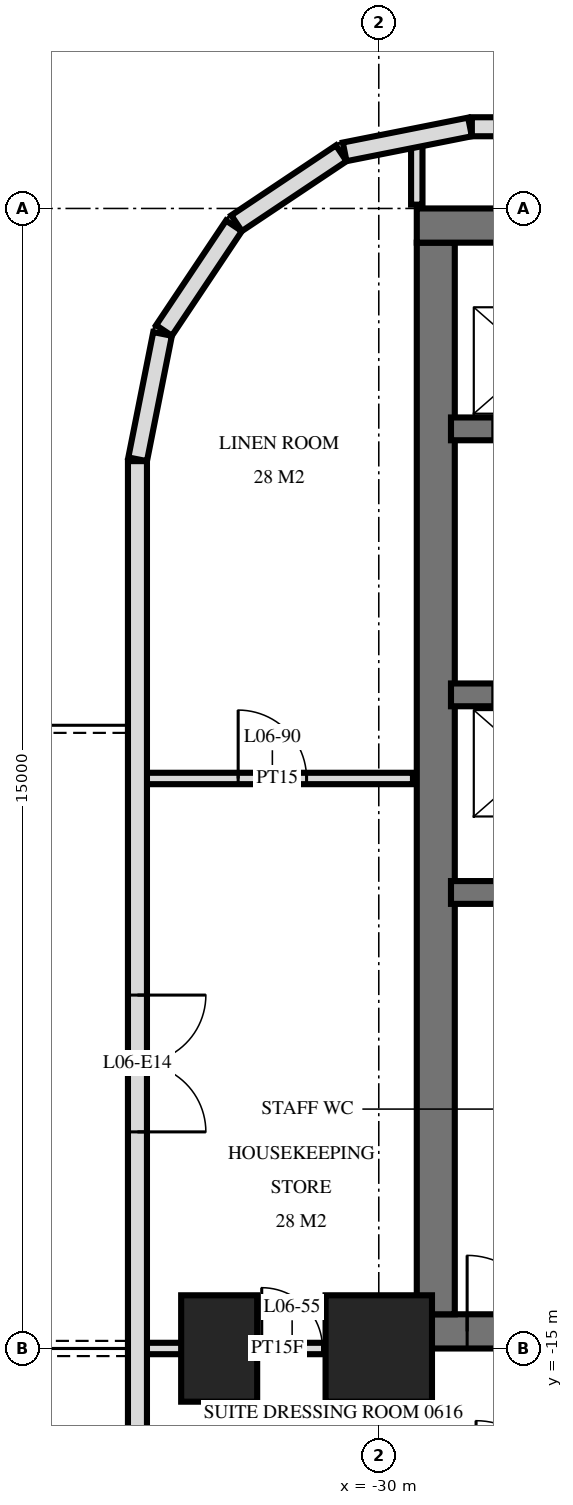
"""IFC4 building model, lengths in metres.
Left out: names, types, materials, properties, quantities, classifications, styles, units other than length and angle.
Written with IfcOpenShell. Run it as: python <this file> out.ifc"""

import sys

from ifc_helpers import new_model, si_unit, direction, frame, frame_2d, origin, origin_2d, place, context, subcontext, project, spatial, rectangle, extrude, element, fill, save


model = new_model("IFC4")
c1 = context("Model", 3, precision=1e-05, world=origin(), true_north=direction((0.0, 1.0)))
c2 = subcontext(c1, "Body", "Model", "MODEL_VIEW")
j1 = project(units=[si_unit("LENGTHUNIT", "METRE"), si_unit("PLANEANGLEUNIT", "RADIAN")], contexts=[c1])
p1 = place(None, origin())
s1 = spatial("IfcSite", under=j1, at=p1, CompositionType="ELEMENT")
p2 = place(p1, origin())
s2 = spatial("IfcBuilding", under=s1, at=p2, CompositionType="ELEMENT")
p3 = place(p2, frame((0.0, 0.0, 31.2)))
s3 = spatial("IfcBuildingStorey", under=s2, at=p3, CompositionType="ELEMENT", Elevation=31.2)
p4 = place(p3, frame((-32.1, -15.0, 0.0), z_axis=(0.0, 0.0, 1.0), x_axis=(0.0, 1.0, 0.0)))
e1 = element("IfcColumn", 1, at=p4, inside=s3, PredefinedType="COLUMN", context=c2, shape_type="SweptSolid", body=[
    extrude(rectangle(XDim=1.4, YDim=1.0, at=origin_2d()), origin(), (0.0, 0.0, 1.0), 3.6),
])
p5 = place(p3, frame((-30.0, -15.0, 0.0), z_axis=(0.0, 0.0, 1.0), x_axis=(1.0, 0.0, 0.0)))
e2 = element("IfcColumn", 2, at=p5, inside=s3, PredefinedType="COLUMN", context=c2, shape_type="SweptSolid", body=[
    extrude(rectangle(XDim=1.4, YDim=1.4, at=origin_2d()), origin(), (0.0, 0.0, 1.0), 3.6),
])
p6 = place(p3, frame((-29.5, -0.225, 0.0), z_axis=(0.0, 0.0, 1.0), x_axis=(1.0, 0.0, 0.0)))
e3 = element("IfcWall", 3, at=p6, inside=s3, PredefinedType="SHEAR", context=c2, shape_type="SweptSolid", body=[
    extrude(rectangle(XDim=19.5, YDim=0.45, at=frame_2d((9.75, 0.0))), origin(), (0.0, 0.0, 1.0), 3.6),
])
p7 = place(p3, frame((-29.5, -14.775, 0.0), z_axis=(0.0, 0.0, 1.0), x_axis=(1.0, 0.0, 0.0)))
e4 = element("IfcWall", 4, at=p7, inside=s3, PredefinedType="SHEAR", context=c2, shape_type="SweptSolid", body=[
    extrude(rectangle(XDim=19.5, YDim=0.45, at=frame_2d((9.75, 0.0))), origin(), (0.0, 0.0, 1.0), 3.6),
])
p8 = place(p7, frame((11.2, 0.0, 0.0)))
e5 = element("IfcOpeningElement", 5, at=p8, cuts=e4, PredefinedType="OPENING", context=c2, shape_type="SweptSolid", body=[
    extrude(rectangle(XDim=1.2, YDim=2.1, at=frame_2d((0.6, 1.05))), frame((0.0, 0.235, 0.0), z_axis=(0.0, -1.0, 0.0), x_axis=(1.0, 0.0, 0.0)), (0.0, 0.0, 1.0), 0.47),
])
p9 = place(p7, frame((14.25, 0.0, 0.0)))
e6 = element("IfcOpeningElement", 6, at=p9, cuts=e4, PredefinedType="OPENING", context=c2, shape_type="SweptSolid", body=[
    extrude(rectangle(XDim=1.1, YDim=2.1, at=frame_2d((0.55, 1.05))), frame((0.0, 0.235, 0.0), z_axis=(0.0, -1.0, 0.0), x_axis=(1.0, 0.0, 0.0)), (0.0, 0.0, 1.0), 0.47),
])
p10 = place(p7, frame((8.5, 0.0, 0.0)))
e7 = element("IfcOpeningElement", 7, at=p10, cuts=e4, PredefinedType="OPENING", context=c2, shape_type="SweptSolid", body=[
    extrude(rectangle(XDim=0.9, YDim=2.1, at=frame_2d((0.45, 1.05))), frame((0.0, 0.235, 0.0), z_axis=(0.0, -1.0, 0.0), x_axis=(1.0, 0.0, 0.0)), (0.0, 0.0, 1.0), 0.47),
])
p11 = place(p7, frame((6.05, 0.0, 0.0)))
e8 = element("IfcOpeningElement", 8, at=p11, cuts=e4, PredefinedType="OPENING", context=c2, shape_type="SweptSolid", body=[
    extrude(rectangle(XDim=1.0, YDim=2.1, at=frame_2d((0.5, 1.05))), frame((0.0, 0.235, 0.0), z_axis=(0.0, -1.0, 0.0), x_axis=(1.0, 0.0, 0.0)), (0.0, 0.0, 1.0), 0.47),
])
p12 = place(p7, frame((2.988, 0.0, 0.0)))
e9 = element("IfcOpeningElement", 9, at=p12, cuts=e4, PredefinedType="OPENING", context=c2, shape_type="SweptSolid", body=[
    extrude(rectangle(XDim=1.0, YDim=2.1, at=frame_2d((0.5, 1.05))), frame((0.0, 0.235, 0.0), z_axis=(0.0, -1.0, 0.0), x_axis=(1.0, 0.0, 0.0)), (0.0, 0.0, 1.0), 0.47),
])
p13 = place(p7, frame((0.663, 0.0, 0.0)))
e10 = element("IfcOpeningElement", 10, at=p13, cuts=e4, PredefinedType="OPENING", context=c2, shape_type="SweptSolid", body=[
    extrude(rectangle(XDim=1.0, YDim=2.1, at=frame_2d((0.5, 1.05))), frame((0.0, 0.235, 0.0), z_axis=(0.0, -1.0, 0.0), x_axis=(1.0, 0.0, 0.0)), (0.0, 0.0, 1.0), 0.47),
])
p14 = place(p3, frame((-29.25, -14.55, 0.0), z_axis=(0.0, 0.0, 1.0), x_axis=(0.0, 1.0, 0.0)))
e11 = element("IfcWall", 11, at=p14, inside=s3, PredefinedType="SHEAR", context=c2, shape_type="SweptSolid", body=[
    extrude(rectangle(XDim=14.1, YDim=0.5, at=frame_2d((7.05, 0.0))), origin(), (0.0, 0.0, 1.0), 3.6),
])
p15 = place(p3, frame((-29.05, -2.9, 0.0), z_axis=(0.0, 0.0, 1.0), x_axis=(1.0, 0.0, 0.0)))
e12 = element("IfcWall", 12, at=p15, inside=s3, PredefinedType="SHEAR", context=c2, shape_type="SweptSolid", body=[
    extrude(rectangle(XDim=18.7, YDim=0.3, at=frame_2d((9.35, 0.0))), origin(), (0.0, 0.0, 1.0), 3.6),
])
p16 = place(p15, frame((2.95, 0.0, 0.0)))
e13 = element("IfcOpeningElement", 13, at=p16, cuts=e12, PredefinedType="OPENING", context=c2, shape_type="SweptSolid", body=[
    extrude(rectangle(XDim=1.1, YDim=2.1, at=frame_2d((0.55, 1.05))), frame((0.0, 0.16, 0.0), z_axis=(0.0, -1.0, 0.0), x_axis=(1.0, 0.0, 0.0)), (0.0, 0.0, 1.0), 0.32),
])
p17 = place(p15, frame((0.55, 0.0, 0.0)))
e14 = element("IfcOpeningElement", 14, at=p17, cuts=e12, PredefinedType="OPENING", context=c2, shape_type="SweptSolid", body=[
    extrude(rectangle(XDim=1.1, YDim=2.1, at=frame_2d((0.55, 1.05))), frame((0.0, 0.16, 0.0), z_axis=(0.0, -1.0, 0.0), x_axis=(1.0, 0.0, 0.0)), (0.0, 0.0, 1.0), 0.32),
])
p18 = place(p15, frame((11.863, 0.0, 0.0)))
e15 = element("IfcOpeningElement", 15, at=p18, cuts=e12, PredefinedType="OPENING", context=c2, shape_type="SweptSolid", body=[
    extrude(rectangle(XDim=0.9, YDim=2.1, at=frame_2d((0.45, 1.05))), frame((0.0, 0.16, 0.0), z_axis=(0.0, -1.0, 0.0), x_axis=(1.0, 0.0, 0.0)), (0.0, 0.0, 1.0), 0.32),
])
p19 = place(p15, frame((10.438, 0.0, 0.0)))
e16 = element("IfcOpeningElement", 16, at=p19, cuts=e12, PredefinedType="OPENING", context=c2, shape_type="SweptSolid", body=[
    extrude(rectangle(XDim=0.9, YDim=2.1, at=frame_2d((0.45, 1.05))), frame((0.0, 0.16, 0.0), z_axis=(0.0, -1.0, 0.0), x_axis=(1.0, 0.0, 0.0)), (0.0, 0.0, 1.0), 0.32),
])
p20 = place(p15, frame((16.85, 0.0, 0.0)))
e17 = element("IfcOpeningElement", 17, at=p20, cuts=e12, PredefinedType="OPENING", context=c2, shape_type="SweptSolid", body=[
    extrude(rectangle(XDim=1.0, YDim=2.1, at=frame_2d((0.5, 1.05))), frame((0.0, 0.16, 0.0), z_axis=(0.0, -1.0, 0.0), x_axis=(1.0, 0.0, 0.0)), (0.0, 0.0, 1.0), 0.32),
])
p21 = place(p15, frame((14.562, 0.0, 0.0)))
e18 = element("IfcOpeningElement", 18, at=p21, cuts=e12, PredefinedType="OPENING", context=c2, shape_type="SweptSolid", body=[
    extrude(rectangle(XDim=1.0, YDim=2.1, at=frame_2d((0.5, 1.05))), frame((0.0, 0.16, 0.0), z_axis=(0.0, -1.0, 0.0), x_axis=(1.0, 0.0, 0.0)), (0.0, 0.0, 1.0), 0.32),
])
p22 = place(p15, frame((13.137, 0.0, 0.0)))
e19 = element("IfcOpeningElement", 19, at=p22, cuts=e12, PredefinedType="OPENING", context=c2, shape_type="SweptSolid", body=[
    extrude(rectangle(XDim=1.0, YDim=2.1, at=frame_2d((0.5, 1.05))), frame((0.0, 0.16, 0.0), z_axis=(0.0, -1.0, 0.0), x_axis=(1.0, 0.0, 0.0)), (0.0, 0.0, 1.0), 0.32),
])
p23 = place(p15, frame((5.6, 0.0, 0.0)))
e20 = element("IfcOpeningElement", 20, at=p23, cuts=e12, PredefinedType="OPENING", context=c2, shape_type="SweptSolid", body=[
    extrude(rectangle(XDim=1.0, YDim=2.1, at=frame_2d((0.5, 1.05))), frame((0.0, 0.16, 0.0), z_axis=(0.0, -1.0, 0.0), x_axis=(1.0, 0.0, 0.0)), (0.0, 0.0, 1.0), 0.32),
])
p24 = place(p3, frame((-29.05, -6.4, 0.0), z_axis=(0.0, 0.0, 1.0), x_axis=(1.0, 0.0, 0.0)))
e21 = element("IfcWall", 21, at=p24, inside=s3, PredefinedType="SHEAR", context=c2, shape_type="SweptSolid", body=[
    extrude(rectangle(XDim=18.7, YDim=0.3, at=frame_2d((9.35, 0.0))), origin(), (0.0, 0.0, 1.0), 3.6),
])
p25 = place(p24, frame((2.95, 0.0, 0.0)))
e22 = element("IfcOpeningElement", 22, at=p25, cuts=e21, PredefinedType="OPENING", context=c2, shape_type="SweptSolid", body=[
    extrude(rectangle(XDim=1.1, YDim=2.1, at=frame_2d((0.55, 1.05))), frame((0.0, 0.16, 0.0), z_axis=(0.0, -1.0, 0.0), x_axis=(1.0, 0.0, 0.0)), (0.0, 0.0, 1.0), 0.32),
])
p26 = place(p24, frame((0.55, 0.0, 0.0)))
e23 = element("IfcOpeningElement", 23, at=p26, cuts=e21, PredefinedType="OPENING", context=c2, shape_type="SweptSolid", body=[
    extrude(rectangle(XDim=1.1, YDim=2.1, at=frame_2d((0.55, 1.05))), frame((0.0, 0.16, 0.0), z_axis=(0.0, -1.0, 0.0), x_axis=(1.0, 0.0, 0.0)), (0.0, 0.0, 1.0), 0.32),
])
p27 = place(p24, frame((10.8, 0.0, 0.0)))
e24 = element("IfcOpeningElement", 24, at=p27, cuts=e21, PredefinedType="OPENING", context=c2, shape_type="SweptSolid", body=[
    extrude(rectangle(XDim=1.1, YDim=2.1, at=frame_2d((0.55, 1.05))), frame((0.0, 0.16, 0.0), z_axis=(0.0, -1.0, 0.0), x_axis=(1.0, 0.0, 0.0)), (0.0, 0.0, 1.0), 0.32),
])
p28 = place(p24, frame((5.6, 0.0, 0.0)))
e25 = element("IfcOpeningElement", 25, at=p28, cuts=e21, PredefinedType="OPENING", context=c2, shape_type="SweptSolid", body=[
    extrude(rectangle(XDim=1.0, YDim=2.1, at=frame_2d((0.5, 1.05))), frame((0.0, 0.16, 0.0), z_axis=(0.0, -1.0, 0.0), x_axis=(1.0, 0.0, 0.0)), (0.0, 0.0, 1.0), 0.32),
])
p29 = place(p3, frame((-29.05, -9.0, 0.0), z_axis=(0.0, 0.0, 1.0), x_axis=(1.0, 0.0, 0.0)))
e26 = element("IfcWall", 26, at=p29, inside=s3, PredefinedType="SHEAR", context=c2, shape_type="SweptSolid", body=[
    extrude(rectangle(XDim=18.7, YDim=0.3, at=frame_2d((9.35, 0.0))), origin(), (0.0, 0.0, 1.0), 3.6),
])
p30 = place(p29, frame((13.8, 0.0, 0.0)))
e27 = element("IfcOpeningElement", 27, at=p30, cuts=e26, PredefinedType="OPENING", context=c2, shape_type="SweptSolid", body=[
    extrude(rectangle(XDim=1.1, YDim=2.1, at=frame_2d((0.55, 1.05))), frame((0.0, 0.16, 0.0), z_axis=(0.0, -1.0, 0.0), x_axis=(1.0, 0.0, 0.0)), (0.0, 0.0, 1.0), 0.32),
])
p31 = place(p3, frame((28.775, 1.075, 0.0), z_axis=(0.0, 0.0, 1.0), x_axis=(-1.0, 0.0, 0.0)))
e28 = element("IfcWall", 28, at=p31, inside=s3, PredefinedType="SOLIDWALL", context=c2, shape_type="SweptSolid", body=[
    extrude(rectangle(XDim=57.551, YDim=0.25, at=frame_2d((28.775, 0.0))), origin(), (0.0, 0.0, 1.0), 3.32),
])
p32 = place(p31, frame((21.275, 0.0, 0.3)))
e29 = element("IfcOpeningElement", 29, at=p32, cuts=e28, PredefinedType="OPENING", context=c2, shape_type="SweptSolid", body=[
    extrude(rectangle(XDim=2.4, YDim=2.1, at=frame_2d((1.2, 1.05))), frame((0.0, 0.135, 0.0), z_axis=(0.0, -1.0, 0.0), x_axis=(1.0, 0.0, 0.0)), (0.0, 0.0, 1.0), 0.27),
])
p33 = place(p31, frame((27.275, 0.0, 0.3)))
e30 = element("IfcOpeningElement", 30, at=p33, cuts=e28, PredefinedType="OPENING", context=c2, shape_type="SweptSolid", body=[
    extrude(rectangle(XDim=2.4, YDim=2.1, at=frame_2d((1.2, 1.05))), frame((0.0, 0.135, 0.0), z_axis=(0.0, -1.0, 0.0), x_axis=(1.0, 0.0, 0.0)), (0.0, 0.0, 1.0), 0.27),
])
p34 = place(p31, frame((30.275, 0.0, 0.3)))
e31 = element("IfcOpeningElement", 31, at=p34, cuts=e28, PredefinedType="OPENING", context=c2, shape_type="SweptSolid", body=[
    extrude(rectangle(XDim=2.4, YDim=2.1, at=frame_2d((1.2, 1.05))), frame((0.0, 0.135, 0.0), z_axis=(0.0, -1.0, 0.0), x_axis=(1.0, 0.0, 0.0)), (0.0, 0.0, 1.0), 0.27),
])
p35 = place(p3, frame((-28.8, 1.073, 0.0), z_axis=(0.0, 0.0, 1.0), x_axis=(-0.980803419081, -0.194999110559, 0.0)))
e32 = element("IfcWall", 32, at=p35, inside=s3, PredefinedType="SOLIDWALL", context=c2, shape_type="SweptSolid", body=[
    extrude(rectangle(XDim=1.681, YDim=0.25, at=frame_2d((0.841, 0.0))), origin(), (0.0, 0.0, 1.0), 3.32),
])
for number, where, z_axis, x_axis in (
    (33, (-30.494, 0.726, 0.0), (0.0, 0.0, 1.0), (-0.831, -0.556, 0.0)),
    (34, (-31.906, -0.229, 0.0), (0.0, 0.0, 1.0), (-0.556, -0.831, 0.0)),
):
    element("IfcWall", number, at=place(p3, frame(where, z_axis=z_axis, x_axis=x_axis)), inside=s3, PredefinedType="SOLIDWALL", context=c2, shape_type="SweptSolid", body=[
        extrude(rectangle(XDim=1.656, YDim=0.25, at=frame_2d((0.828, 0.0))), origin(), (0.0, 0.0, 1.0), 3.32),
    ])
p36 = place(p3, frame((-32.844, -1.651, 0.0), z_axis=(0.0, 0.0, 1.0), x_axis=(-0.19513878023, -0.980775640221, 0.0)))
e35 = element("IfcWall", 35, at=p36, inside=s3, PredefinedType="SOLIDWALL", context=c2, shape_type="SweptSolid", body=[
    extrude(rectangle(XDim=1.681, YDim=0.25, at=frame_2d((0.841, 0.0))), origin(), (0.0, 0.0, 1.0), 3.32),
])
p37 = place(p3, frame((-33.175, -3.325, 0.0), z_axis=(0.0, 0.0, 1.0), x_axis=(0.0, -1.0, 0.0)))
e36 = element("IfcWall", 36, at=p37, inside=s3, PredefinedType="SOLIDWALL", context=c2, shape_type="SweptSolid", body=[
    extrude(rectangle(XDim=21.551, YDim=0.25, at=frame_2d((10.775, 0.0))), origin(), (0.0, 0.0, 1.0), 3.32),
])
p38 = place(p37, frame((7.025, 0.0, 0.0)))
e37 = element("IfcOpeningElement", 37, at=p38, cuts=e36, PredefinedType="OPENING", context=c2, shape_type="SweptSolid", body=[
    extrude(rectangle(XDim=1.8, YDim=2.4, at=frame_2d((0.9, 1.2))), frame((0.0, 0.135, 0.0), z_axis=(0.0, -1.0, 0.0), x_axis=(1.0, 0.0, 0.0)), (0.0, 0.0, 1.0), 0.27),
])
p39 = place(p37, frame((14.225, 0.0, 0.0)))
e38 = element("IfcOpeningElement", 38, at=p39, cuts=e36, PredefinedType="OPENING", context=c2, shape_type="SweptSolid", body=[
    extrude(rectangle(XDim=1.8, YDim=2.4, at=frame_2d((0.9, 1.2))), frame((0.0, 0.135, 0.0), z_axis=(0.0, -1.0, 0.0), x_axis=(1.0, 0.0, 0.0)), (0.0, 0.0, 1.0), 0.27),
])
p40 = place(p37, frame((18.875, 0.0, 0.0)))
e39 = element("IfcOpeningElement", 39, at=p40, cuts=e36, PredefinedType="OPENING", context=c2, shape_type="SweptSolid", body=[
    extrude(rectangle(XDim=1.8, YDim=2.4, at=frame_2d((0.9, 1.2))), frame((0.0, 0.135, 0.0), z_axis=(0.0, -1.0, 0.0), x_axis=(1.0, 0.0, 0.0)), (0.0, 0.0, 1.0), 0.27),
])
p41 = place(p3, frame((-29.5, 0.05, 0.0), z_axis=(0.0, 0.0, 1.0), x_axis=(0.0, 1.0, 0.0)))
e40 = element("IfcWall", 40, at=p41, inside=s3, PredefinedType="PARTITIONING", context=c2, shape_type="SweptSolid", body=[
    extrude(rectangle(XDim=0.827, YDim=0.15, at=frame_2d((0.414, 0.0))), origin(), (0.0, 0.0, 1.0), 3.32),
])
p42 = place(p3, frame((-33.12, -15.0, 0.0), z_axis=(0.0, 0.0, 1.0), x_axis=(1.0, 0.0, 0.0)))
e41 = element("IfcWall", 41, at=p42, inside=s3, PredefinedType="PARTITIONING", context=c2, shape_type="SweptSolid", body=[
    extrude(rectangle(XDim=3.57, YDim=0.15, at=frame_2d((1.785, 0.0))), origin(), (0.0, 0.0, 1.0), 3.32),
])
p43 = place(p42, frame((1.58, 0.0, 0.0)))
e42 = element("IfcOpeningElement", 42, at=p43, cuts=e41, PredefinedType="OPENING", context=c2, shape_type="SweptSolid", body=[
    extrude(rectangle(XDim=0.8, YDim=2.1, at=frame_2d((0.4, 1.05))), frame((0.0, 0.085, 0.0), z_axis=(0.0, -1.0, 0.0), x_axis=(1.0, 0.0, 0.0)), (0.0, 0.0, 1.0), 0.17),
])
p44 = place(p3, frame((-33.12, -7.5, 0.0), z_axis=(0.0, 0.0, 1.0), x_axis=(1.0, 0.0, 0.0)))
e43 = element("IfcWall", 43, at=p44, inside=s3, PredefinedType="PARTITIONING", context=c2, shape_type="SweptSolid", body=[
    extrude(rectangle(XDim=3.57, YDim=0.15, at=frame_2d((1.785, 0.0))), origin(), (0.0, 0.0, 1.0), 3.32),
])
p45 = place(p44, frame((1.27, 0.0, 0.0)))
e44 = element("IfcOpeningElement", 44, at=p45, cuts=e43, PredefinedType="OPENING", context=c2, shape_type="SweptSolid", body=[
    extrude(rectangle(XDim=0.9, YDim=2.1, at=frame_2d((0.45, 1.05))), frame((0.0, 0.085, 0.0), z_axis=(0.0, -1.0, 0.0), x_axis=(1.0, 0.0, 0.0)), (0.0, 0.0, 1.0), 0.17),
])
p46 = place(p38, origin())
e45 = element("IfcDoor", 45, at=p46, inside=s3, OperationType="DOUBLE_DOOR_SINGLE_SWING", PredefinedType="DOOR", context=c2, shape_type="SweptSolid", body=[
    extrude(rectangle(XDim=1.8, YDim=2.4, at=frame_2d((0.9, 1.2))), frame((0.0, 0.025, 0.0), z_axis=(0.0, -1.0, 0.0), x_axis=(1.0, 0.0, 0.0)), (0.0, 0.0, 1.0), 0.05),
])
fill(e37, e45)
p47 = place(p13, origin())
e46 = element("IfcDoor", 46, at=p47, inside=s3, OperationType="SINGLE_SWING_RIGHT", PredefinedType="DOOR", context=c2, shape_type="SweptSolid", body=[
    extrude(rectangle(XDim=1.0, YDim=2.1, at=frame_2d((0.5, 1.05))), frame((0.0, 0.025, 0.0), z_axis=(0.0, -1.0, 0.0), x_axis=(1.0, 0.0, 0.0)), (0.0, 0.0, 1.0), 0.05),
])
fill(e10, e46)
p48 = place(p43, origin())
e47 = element("IfcDoor", 47, at=p48, inside=s3, OperationType="SINGLE_SWING_RIGHT", PredefinedType="DOOR", context=c2, shape_type="SweptSolid", body=[
    extrude(rectangle(XDim=0.8, YDim=2.1, at=frame_2d((0.4, 1.05))), frame((0.0, 0.025, 0.0), z_axis=(0.0, -1.0, 0.0), x_axis=(1.0, 0.0, 0.0)), (0.0, 0.0, 1.0), 0.05),
])
fill(e42, e47)
p49 = place(p45, origin())
e48 = element("IfcDoor", 48, at=p49, inside=s3, OperationType="SINGLE_SWING_RIGHT", PredefinedType="DOOR", context=c2, shape_type="SweptSolid", body=[
    extrude(rectangle(XDim=0.9, YDim=2.1, at=frame_2d((0.45, 1.05))), frame((0.0, 0.025, 0.0), z_axis=(0.0, -1.0, 0.0), x_axis=(1.0, 0.0, 0.0)), (0.0, 0.0, 1.0), 0.05),
])
fill(e44, e48)
save(model, sys.argv[1])
